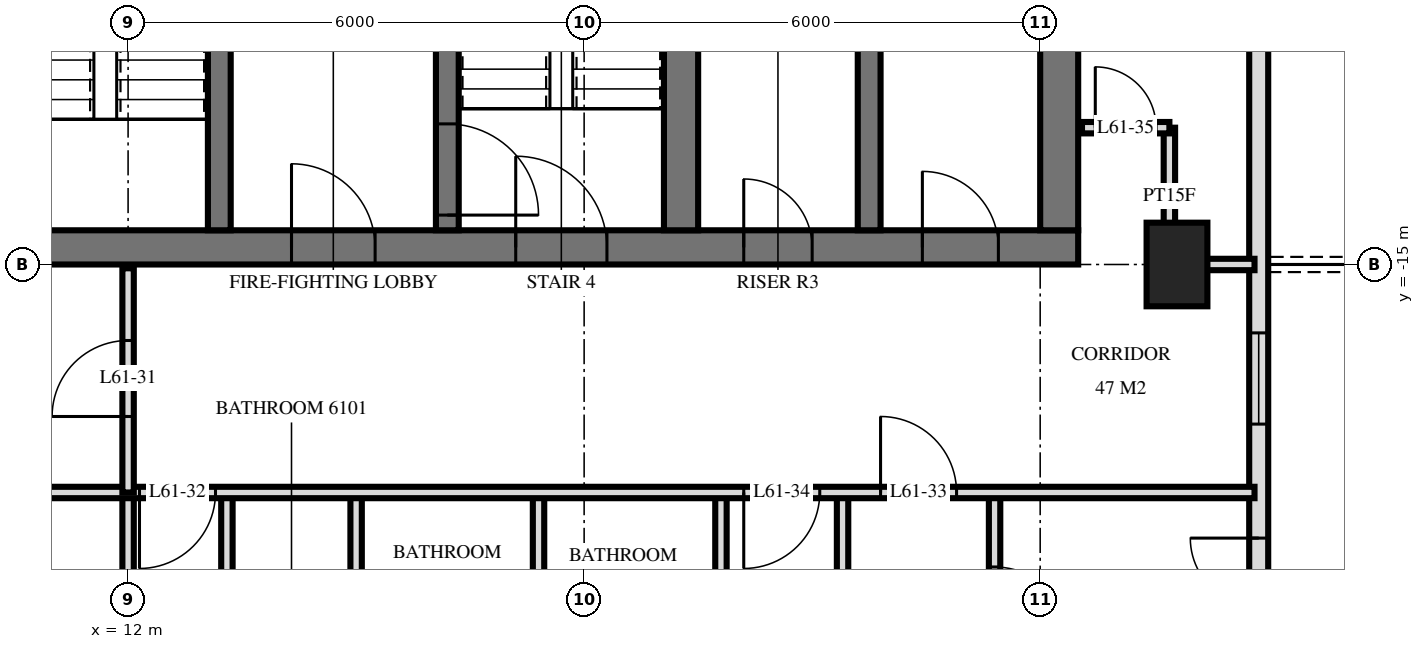
"""IFC4 building model, lengths in metres.
Left out: names, types, materials, properties, quantities, classifications, styles, units other than length and angle.
Written with IfcOpenShell. Run it as: python <this file> out.ifc"""

import sys

from ifc_helpers import new_model, si_unit, direction, frame, frame_2d, origin, origin_2d, place, context, subcontext, project, spatial, rectangle, extrude, element, fill, save


model = new_model("IFC4")
c1 = context("Model", 3, precision=1e-05, world=origin(), true_north=direction((0.0, 1.0)))
c2 = subcontext(c1, "Body", "Model", "MODEL_VIEW")
j1 = project(units=[si_unit("LENGTHUNIT", "METRE"), si_unit("PLANEANGLEUNIT", "RADIAN")], contexts=[c1])
p1 = place(None, origin())
s1 = spatial("IfcSite", under=j1, at=p1, CompositionType="ELEMENT")
p2 = place(p1, origin())
s2 = spatial("IfcBuilding", under=s1, at=p2, CompositionType="ELEMENT")
p3 = place(p2, frame((0.0, 0.0, 232.6)))
s3 = spatial("IfcBuildingStorey", under=s2, at=p3, CompositionType="ELEMENT", Elevation=232.6)
p4 = place(p3, frame((25.8, -15.0, 0.0), z_axis=(0.0, 0.0, 1.0), x_axis=(0.0, 1.0, 0.0)))
e1 = element("IfcColumn", 1, at=p4, inside=s3, PredefinedType="COLUMN", context=c2, shape_type="SweptSolid", body=[
    extrude(rectangle(XDim=1.1, YDim=0.8, at=origin_2d()), origin(), (0.0, 0.0, 1.0), 3.5),
])
p5 = place(p3, frame((10.0, -14.775, 0.0), z_axis=(0.0, 0.0, 1.0), x_axis=(1.0, 0.0, 0.0)))
e2 = element("IfcWall", 2, at=p5, inside=s3, PredefinedType="SHEAR", context=c2, shape_type="SweptSolid", body=[
    extrude(rectangle(XDim=14.5, YDim=0.45, at=frame_2d((7.25, 0.0))), origin(), (0.0, 0.0, 1.0), 3.5),
])
p6 = place(p5, frame((7.1, 0.0, 0.0)))
e3 = element("IfcOpeningElement", 3, at=p6, cuts=e2, PredefinedType="OPENING", context=c2, shape_type="SweptSolid", body=[
    extrude(rectangle(XDim=1.2, YDim=2.1, at=frame_2d((0.6, 1.05))), frame((0.0, 0.235, 0.0), z_axis=(0.0, -1.0, 0.0), x_axis=(1.0, 0.0, 0.0)), (0.0, 0.0, 1.0), 0.47),
])
p7 = place(p5, frame((4.15, 0.0, 0.0)))
e4 = element("IfcOpeningElement", 4, at=p7, cuts=e2, PredefinedType="OPENING", context=c2, shape_type="SweptSolid", body=[
    extrude(rectangle(XDim=1.1, YDim=2.1, at=frame_2d((0.55, 1.05))), frame((0.0, 0.235, 0.0), z_axis=(0.0, -1.0, 0.0), x_axis=(1.0, 0.0, 0.0)), (0.0, 0.0, 1.0), 0.47),
])
p8 = place(p5, frame((10.1, 0.0, 0.0)))
e5 = element("IfcOpeningElement", 5, at=p8, cuts=e2, PredefinedType="OPENING", context=c2, shape_type="SweptSolid", body=[
    extrude(rectangle(XDim=0.9, YDim=2.1, at=frame_2d((0.45, 1.05))), frame((0.0, 0.235, 0.0), z_axis=(0.0, -1.0, 0.0), x_axis=(1.0, 0.0, 0.0)), (0.0, 0.0, 1.0), 0.47),
])
p9 = place(p5, frame((12.45, 0.0, 0.0)))
e6 = element("IfcOpeningElement", 6, at=p9, cuts=e2, PredefinedType="OPENING", context=c2, shape_type="SweptSolid", body=[
    extrude(rectangle(XDim=1.0, YDim=2.1, at=frame_2d((0.5, 1.05))), frame((0.0, 0.235, 0.0), z_axis=(0.0, -1.0, 0.0), x_axis=(1.0, 0.0, 0.0)), (0.0, 0.0, 1.0), 0.47),
])
p10 = place(p3, frame((24.25, -14.55, 0.0), z_axis=(0.0, 0.0, 1.0), x_axis=(0.0, 1.0, 0.0)))
e7 = element("IfcWall", 7, at=p10, inside=s3, PredefinedType="SHEAR", context=c2, shape_type="SweptSolid", body=[
    extrude(rectangle(XDim=14.1, YDim=0.5, at=frame_2d((7.05, 0.0))), origin(), (0.0, 0.0, 1.0), 3.5),
])
p11 = place(p3, frame((13.2, -14.55, 0.0), z_axis=(0.0, 0.0, 1.0), x_axis=(0.0, 1.0, 0.0)))
e8 = element("IfcWall", 8, at=p11, inside=s3, PredefinedType="SHEAR", context=c2, shape_type="SweptSolid", body=[
    extrude(rectangle(XDim=5.4, YDim=0.3, at=frame_2d((2.7, 0.0))), origin(), (0.0, 0.0, 1.0), 3.5),
])
p12 = place(p11, frame((4.0, 0.0, 0.0)))
e9 = element("IfcOpeningElement", 9, at=p12, cuts=e8, PredefinedType="OPENING", context=c2, shape_type="SweptSolid", body=[
    extrude(rectangle(XDim=1.2, YDim=2.1, at=frame_2d((0.6, 1.05))), frame((0.0, 0.16, 0.0), z_axis=(0.0, -1.0, 0.0), x_axis=(1.0, 0.0, 0.0)), (0.0, 0.0, 1.0), 0.32),
])
p13 = place(p3, frame((16.2, -14.55, 0.0), z_axis=(0.0, 0.0, 1.0), x_axis=(0.0, 1.0, 0.0)))
e10 = element("IfcWall", 10, at=p13, inside=s3, PredefinedType="SHEAR", context=c2, shape_type="SweptSolid", body=[
    extrude(rectangle(XDim=5.4, YDim=0.3, at=frame_2d((2.7, 0.0))), origin(), (0.0, 0.0, 1.0), 3.5),
])
p14 = place(p13, frame((0.2, 0.0, 0.0)))
e11 = element("IfcOpeningElement", 11, at=p14, cuts=e10, PredefinedType="OPENING", context=c2, shape_type="SweptSolid", body=[
    extrude(rectangle(XDim=1.2, YDim=2.1, at=frame_2d((0.6, 1.05))), frame((0.0, 0.16, 0.0), z_axis=(0.0, -1.0, 0.0), x_axis=(1.0, 0.0, 0.0)), (0.0, 0.0, 1.0), 0.32),
])
p15 = place(p3, frame((19.275, -14.55, 0.0), z_axis=(0.0, 0.0, 1.0), x_axis=(0.0, 1.0, 0.0)))
e12 = element("IfcWall", 12, at=p15, inside=s3, PredefinedType="SHEAR", context=c2, shape_type="SweptSolid", body=[
    extrude(rectangle(XDim=5.4, YDim=0.45, at=frame_2d((2.7, 0.0))), origin(), (0.0, 0.0, 1.0), 3.5),
])
p16 = place(p3, frame((21.75, -14.55, 0.0), z_axis=(0.0, 0.0, 1.0), x_axis=(0.0, 1.0, 0.0)))
e13 = element("IfcWall", 13, at=p16, inside=s3, PredefinedType="SHEAR", context=c2, shape_type="SweptSolid", body=[
    extrude(rectangle(XDim=5.4, YDim=0.3, at=frame_2d((2.7, 0.0))), origin(), (0.0, 0.0, 1.0), 3.5),
])
p17 = place(p3, frame((26.875, -24.875, 0.0), z_axis=(0.0, 0.0, 1.0), x_axis=(0.0, 1.0, 0.0)))
e14 = element("IfcWall", 14, at=p17, inside=s3, PredefinedType="SOLIDWALL", context=c2, shape_type="SweptSolid", body=[
    extrude(rectangle(XDim=21.551, YDim=0.25, at=frame_2d((10.775, 0.0))), origin(), (0.0, 0.0, 1.0), 3.22),
])
p18 = place(p17, frame((0.575, 0.0, 0.0)))
e15 = element("IfcOpeningElement", 15, at=p18, cuts=e14, PredefinedType="OPENING", context=c2, shape_type="SweptSolid", body=[
    extrude(rectangle(XDim=1.8, YDim=2.4, at=frame_2d((0.9, 1.2))), frame((0.0, 0.135, 0.0), z_axis=(0.0, -1.0, 0.0), x_axis=(1.0, 0.0, 0.0)), (0.0, 0.0, 1.0), 0.27),
])
p19 = place(p17, frame((4.475, 0.0, 0.0)))
e16 = element("IfcOpeningElement", 16, at=p19, cuts=e14, PredefinedType="OPENING", context=c2, shape_type="SweptSolid", body=[
    extrude(rectangle(XDim=1.8, YDim=2.4, at=frame_2d((0.9, 1.2))), frame((0.0, 0.135, 0.0), z_axis=(0.0, -1.0, 0.0), x_axis=(1.0, 0.0, 0.0)), (0.0, 0.0, 1.0), 0.27),
])
p20 = place(p17, frame((7.775, 0.0, 0.9)))
e17 = element("IfcOpeningElement", 17, at=p20, cuts=e14, PredefinedType="OPENING", context=c2, shape_type="SweptSolid", body=[
    extrude(rectangle(XDim=1.2, YDim=1.5, at=frame_2d((0.6, 0.75))), frame((0.0, 0.135, 0.0), z_axis=(0.0, -1.0, 0.0), x_axis=(1.0, 0.0, 0.0)), (0.0, 0.0, 1.0), 0.27),
])
p21 = place(p17, frame((13.1, 0.0, 0.0)))
e18 = element("IfcOpeningElement", 18, at=p21, cuts=e14, PredefinedType="OPENING", context=c2, shape_type="SweptSolid", body=[
    extrude(rectangle(XDim=1.8, YDim=2.4, at=frame_2d((0.9, 1.2))), frame((0.0, 0.135, 0.0), z_axis=(0.0, -1.0, 0.0), x_axis=(1.0, 0.0, 0.0)), (0.0, 0.0, 1.0), 0.27),
])
p22 = place(p3, frame((25.7, -15.0, 0.0), z_axis=(0.0, 0.0, 1.0), x_axis=(0.0, 1.0, 0.0)))
e19 = element("IfcWall", 19, at=p22, inside=s3, PredefinedType="PARTITIONING", context=c2, shape_type="SweptSolid", body=[
    extrude(rectangle(XDim=1.8, YDim=0.15, at=frame_2d((0.9, 0.0))), origin(), (0.0, 0.0, 1.0), 3.22),
])
p23 = place(p3, frame((23.4, -21.0, 0.0), z_axis=(0.0, 0.0, 1.0), x_axis=(0.0, 1.0, 0.0)))
e20 = element("IfcWall", 20, at=p23, inside=s3, PredefinedType="PARTITIONING", context=c2, shape_type="SweptSolid", body=[
    extrude(rectangle(XDim=3.0, YDim=0.15, at=frame_2d((1.5, 0.0))), origin(), (0.0, 0.0, 1.0), 3.22),
])
p24 = place(p23, frame((1.02, 0.0, 0.0)))
e21 = element("IfcOpeningElement", 21, at=p24, cuts=e20, PredefinedType="OPENING", context=c2, shape_type="SweptSolid", body=[
    extrude(rectangle(XDim=1.0, YDim=2.1, at=frame_2d((0.5, 1.05))), frame((0.0, 0.085, 0.0), z_axis=(0.0, -1.0, 0.0), x_axis=(1.0, 0.0, 0.0)), (0.0, 0.0, 1.0), 0.17),
])
for number, where, z_axis, x_axis in (
    (22, (21.4, -21.0, 0.0), (0.0, 0.0, 1.0), (0.0, 1.0, 0.0)),
    (23, (19.8, -21.0, 0.0), (0.0, 0.0, 1.0), (0.0, 1.0, 0.0)),
    (24, (17.4, -21.0, 0.0), (0.0, 0.0, 1.0), (0.0, 1.0, 0.0)),
):
    element("IfcWall", number, at=place(p3, frame(where, z_axis=z_axis, x_axis=x_axis)), inside=s3, PredefinedType="PARTITIONING", context=c2, shape_type="SweptSolid", body=[
        extrude(rectangle(XDim=3.0, YDim=0.15, at=frame_2d((1.5, 0.0))), origin(), (0.0, 0.0, 1.0), 3.22),
    ])
p25 = place(p3, frame((15.0, -29.22, 0.0), z_axis=(0.0, 0.0, 1.0), x_axis=(0.0, 1.0, 0.0)))
e25 = element("IfcWall", 25, at=p25, inside=s3, PredefinedType="PARTITIONING", context=c2, shape_type="SweptSolid", body=[
    extrude(rectangle(XDim=11.22, YDim=0.15, at=frame_2d((5.61, 0.0))), origin(), (0.0, 0.0, 1.0), 3.22),
])
p26 = place(p3, frame((13.3, -21.0, 0.0), z_axis=(0.0, 0.0, 1.0), x_axis=(0.0, 1.0, 0.0)))
e26 = element("IfcWall", 26, at=p26, inside=s3, PredefinedType="PARTITIONING", context=c2, shape_type="SweptSolid", body=[
    extrude(rectangle(XDim=3.0, YDim=0.15, at=frame_2d((1.5, 0.0))), origin(), (0.0, 0.0, 1.0), 3.22),
])
p27 = place(p26, frame((1.12, 0.0, 0.0)))
e27 = element("IfcOpeningElement", 27, at=p27, cuts=e26, PredefinedType="OPENING", context=c2, shape_type="SweptSolid", body=[
    extrude(rectangle(XDim=0.8, YDim=2.1, at=frame_2d((0.4, 1.05))), frame((0.0, 0.085, 0.0), z_axis=(0.0, -1.0, 0.0), x_axis=(1.0, 0.0, 0.0)), (0.0, 0.0, 1.0), 0.17),
])
p28 = place(p3, frame((12.0, -18.0, 0.0), z_axis=(0.0, 0.0, 1.0), x_axis=(0.0, 1.0, 0.0)))
e28 = element("IfcWall", 28, at=p28, inside=s3, PredefinedType="PARTITIONING", context=c2, shape_type="SweptSolid", body=[
    extrude(rectangle(XDim=2.95, YDim=0.15, at=frame_2d((1.475, 0.0))), origin(), (0.0, 0.0, 1.0), 3.22),
])
p29 = place(p28, frame((1.0, 0.0, 0.0)))
e29 = element("IfcOpeningElement", 29, at=p29, cuts=e28, PredefinedType="OPENING", context=c2, shape_type="SweptSolid", body=[
    extrude(rectangle(XDim=1.0, YDim=2.1, at=frame_2d((0.5, 1.05))), frame((0.0, 0.085, 0.0), z_axis=(0.0, -1.0, 0.0), x_axis=(1.0, 0.0, 0.0)), (0.0, 0.0, 1.0), 0.17),
])
p30 = place(p3, frame((12.0, -29.22, 0.0), z_axis=(0.0, 0.0, 1.0), x_axis=(0.0, 1.0, 0.0)))
e30 = element("IfcWall", 30, at=p30, inside=s3, PredefinedType="PARTITIONING", context=c2, shape_type="SweptSolid", body=[
    extrude(rectangle(XDim=11.22, YDim=0.15, at=frame_2d((5.61, 0.0))), origin(), (0.0, 0.0, 1.0), 3.22),
])
p31 = place(p3, frame((-26.82, -18.0, 0.0), z_axis=(0.0, 0.0, 1.0), x_axis=(1.0, 0.0, 0.0)))
e31 = element("IfcWall", 31, at=p31, inside=s3, PredefinedType="PARTITIONING", context=c2, shape_type="SweptSolid", body=[
    extrude(rectangle(XDim=53.64, YDim=0.15, at=frame_2d((26.82, 0.0))), origin(), (0.0, 0.0, 1.0), 3.22),
])
p32 = place(p31, frame((4.92, 0.0, 0.0)))
e32 = element("IfcOpeningElement", 32, at=p32, cuts=e31, PredefinedType="OPENING", context=c2, shape_type="SweptSolid", body=[
    extrude(rectangle(XDim=1.0, YDim=2.1, at=frame_2d((0.5, 1.05))), frame((0.0, 0.085, 0.0), z_axis=(0.0, -1.0, 0.0), x_axis=(1.0, 0.0, 0.0)), (0.0, 0.0, 1.0), 0.17),
])
p33 = place(p31, frame((1.62, 0.0, 0.0)))
e33 = element("IfcOpeningElement", 33, at=p33, cuts=e31, PredefinedType="OPENING", context=c2, shape_type="SweptSolid", body=[
    extrude(rectangle(XDim=1.0, YDim=2.1, at=frame_2d((0.5, 1.05))), frame((0.0, 0.085, 0.0), z_axis=(0.0, -1.0, 0.0), x_axis=(1.0, 0.0, 0.0)), (0.0, 0.0, 1.0), 0.17),
])
p34 = place(p31, frame((38.97, 0.0, 0.0)))
e34 = element("IfcOpeningElement", 34, at=p34, cuts=e31, PredefinedType="OPENING", context=c2, shape_type="SweptSolid", body=[
    extrude(rectangle(XDim=1.0, YDim=2.1, at=frame_2d((0.5, 1.05))), frame((0.0, 0.085, 0.0), z_axis=(0.0, -1.0, 0.0), x_axis=(1.0, 0.0, 0.0)), (0.0, 0.0, 1.0), 0.17),
])
p35 = place(p31, frame((48.72, 0.0, 0.0)))
e35 = element("IfcOpeningElement", 35, at=p35, cuts=e31, PredefinedType="OPENING", context=c2, shape_type="SweptSolid", body=[
    extrude(rectangle(XDim=1.0, YDim=2.1, at=frame_2d((0.5, 1.05))), frame((0.0, 0.085, 0.0), z_axis=(0.0, -1.0, 0.0), x_axis=(1.0, 0.0, 0.0)), (0.0, 0.0, 1.0), 0.17),
])
p36 = place(p31, frame((46.92, 0.0, 0.0)))
e36 = element("IfcOpeningElement", 36, at=p36, cuts=e31, PredefinedType="OPENING", context=c2, shape_type="SweptSolid", body=[
    extrude(rectangle(XDim=1.0, YDim=2.1, at=frame_2d((0.5, 1.05))), frame((0.0, 0.085, 0.0), z_axis=(0.0, -1.0, 0.0), x_axis=(1.0, 0.0, 0.0)), (0.0, 0.0, 1.0), 0.17),
])
p37 = place(p31, frame((18.82, 0.0, 0.0)))
e37 = element("IfcOpeningElement", 37, at=p37, cuts=e31, PredefinedType="OPENING", context=c2, shape_type="SweptSolid", body=[
    extrude(rectangle(XDim=1.0, YDim=2.1, at=frame_2d((0.5, 1.05))), frame((0.0, 0.085, 0.0), z_axis=(0.0, -1.0, 0.0), x_axis=(1.0, 0.0, 0.0)), (0.0, 0.0, 1.0), 0.17),
])
p38 = place(p31, frame((27.82, 0.0, 0.0)))
e38 = element("IfcOpeningElement", 38, at=p38, cuts=e31, PredefinedType="OPENING", context=c2, shape_type="SweptSolid", body=[
    extrude(rectangle(XDim=1.0, YDim=2.1, at=frame_2d((0.5, 1.05))), frame((0.0, 0.085, 0.0), z_axis=(0.0, -1.0, 0.0), x_axis=(1.0, 0.0, 0.0)), (0.0, 0.0, 1.0), 0.17),
])
p39 = place(p31, frame((35.32, 0.0, 0.0)))
e39 = element("IfcOpeningElement", 39, at=p39, cuts=e31, PredefinedType="OPENING", context=c2, shape_type="SweptSolid", body=[
    extrude(rectangle(XDim=1.0, YDim=2.1, at=frame_2d((0.5, 1.05))), frame((0.0, 0.085, 0.0), z_axis=(0.0, -1.0, 0.0), x_axis=(1.0, 0.0, 0.0)), (0.0, 0.0, 1.0), 0.17),
])
p40 = place(p3, frame((25.7, -15.0, 0.0), z_axis=(0.0, 0.0, 1.0), x_axis=(1.0, 0.0, 0.0)))
e40 = element("IfcWall", 40, at=p40, inside=s3, PredefinedType="PARTITIONING", context=c2, shape_type="SweptSolid", body=[
    extrude(rectangle(XDim=1.12, YDim=0.15, at=frame_2d((0.56, 0.0))), origin(), (0.0, 0.0, 1.0), 3.22),
])
p41 = place(p3, frame((24.55, -13.2, 0.0), z_axis=(0.0, 0.0, 1.0), x_axis=(1.0, 0.0, 0.0)))
e41 = element("IfcWall", 41, at=p41, inside=s3, PredefinedType="PARTITIONING", context=c2, shape_type="SweptSolid", body=[
    extrude(rectangle(XDim=1.15, YDim=0.15, at=frame_2d((0.575, 0.0))), origin(), (0.0, 0.0, 1.0), 3.22),
])
p42 = place(p41, frame((0.175, 0.0, 0.0)))
e42 = element("IfcOpeningElement", 42, at=p42, cuts=e41, PredefinedType="OPENING", context=c2, shape_type="SweptSolid", body=[
    extrude(rectangle(XDim=0.8, YDim=2.1, at=frame_2d((0.4, 1.05))), frame((0.0, 0.085, 0.0), z_axis=(0.0, -1.0, 0.0), x_axis=(1.0, 0.0, 0.0)), (0.0, 0.0, 1.0), 0.17),
])
p43 = place(p19, origin())
e43 = element("IfcDoor", 43, at=p43, inside=s3, OperationType="DOUBLE_DOOR_SINGLE_SWING", PredefinedType="DOOR", context=c2, shape_type="SweptSolid", body=[
    extrude(rectangle(XDim=1.8, YDim=2.4, at=frame_2d((0.9, 1.2))), frame((0.0, 0.025, 0.0), z_axis=(0.0, -1.0, 0.0), x_axis=(1.0, 0.0, 0.0)), (0.0, 0.0, 1.0), 0.05),
])
fill(e16, e43)
p44 = place(p20, origin())
e44 = element("IfcWindow", 44, at=p44, inside=s3, PartitioningType="SINGLE_PANEL", PredefinedType="WINDOW", context=c2, shape_type="SweptSolid", body=[
    extrude(rectangle(XDim=1.2, YDim=1.5, at=frame_2d((0.6, 0.75))), frame((0.0, 0.03, 0.0), z_axis=(0.0, -1.0, 0.0), x_axis=(1.0, 0.0, 0.0)), (0.0, 0.0, 1.0), 0.06),
])
fill(e17, e44)
p45 = place(p6, origin())
e45 = element("IfcDoor", 45, at=p45, inside=s3, OperationType="SINGLE_SWING_RIGHT", PredefinedType="DOOR", context=c2, shape_type="SweptSolid", body=[
    extrude(rectangle(XDim=1.2, YDim=2.1, at=frame_2d((0.6, 1.05))), frame((0.0, 0.025, 0.0), z_axis=(0.0, -1.0, 0.0), x_axis=(1.0, 0.0, 0.0)), (0.0, 0.0, 1.0), 0.05),
])
fill(e3, e45)
p46 = place(p7, origin())
e46 = element("IfcDoor", 46, at=p46, inside=s3, OperationType="SINGLE_SWING_RIGHT", PredefinedType="DOOR", context=c2, shape_type="SweptSolid", body=[
    extrude(rectangle(XDim=1.1, YDim=2.1, at=frame_2d((0.55, 1.05))), frame((0.0, 0.025, 0.0), z_axis=(0.0, -1.0, 0.0), x_axis=(1.0, 0.0, 0.0)), (0.0, 0.0, 1.0), 0.05),
])
fill(e4, e46)
p47 = place(p8, origin())
e47 = element("IfcDoor", 47, at=p47, inside=s3, OperationType="SINGLE_SWING_RIGHT", PredefinedType="DOOR", context=c2, shape_type="SweptSolid", body=[
    extrude(rectangle(XDim=0.9, YDim=2.1, at=frame_2d((0.45, 1.05))), frame((0.0, 0.025, 0.0), z_axis=(0.0, -1.0, 0.0), x_axis=(1.0, 0.0, 0.0)), (0.0, 0.0, 1.0), 0.05),
])
fill(e5, e47)
p48 = place(p9, origin())
e48 = element("IfcDoor", 48, at=p48, inside=s3, OperationType="SINGLE_SWING_RIGHT", PredefinedType="DOOR", context=c2, shape_type="SweptSolid", body=[
    extrude(rectangle(XDim=1.0, YDim=2.1, at=frame_2d((0.5, 1.05))), frame((0.0, 0.025, 0.0), z_axis=(0.0, -1.0, 0.0), x_axis=(1.0, 0.0, 0.0)), (0.0, 0.0, 1.0), 0.05),
])
fill(e6, e48)
p49 = place(p14, frame((0.6, 0.0, 0.0), z_axis=(0.0, 0.0, 1.0), x_axis=(-1.0, 0.0, 0.0)))
e49 = element("IfcDoor", 49, at=p49, inside=s3, OperationType="SINGLE_SWING_LEFT", PredefinedType="DOOR", context=c2, shape_type="SweptSolid", body=[
    extrude(rectangle(XDim=1.2, YDim=2.1, at=frame_2d((0.0, 1.05))), frame((0.0, -0.025, 0.0), z_axis=(0.0, 1.0, 0.0), x_axis=(-1.0, 0.0, 0.0)), (0.0, 0.0, 1.0), 0.05),
])
fill(e11, e49)
p50 = place(p29, origin())
e50 = element("IfcDoor", 50, at=p50, inside=s3, OperationType="SINGLE_SWING_RIGHT", PredefinedType="DOOR", context=c2, shape_type="SweptSolid", body=[
    extrude(rectangle(XDim=1.0, YDim=2.1, at=frame_2d((0.5, 1.05))), frame((0.0, 0.025, 0.0), z_axis=(0.0, -1.0, 0.0), x_axis=(1.0, 0.0, 0.0)), (0.0, 0.0, 1.0), 0.05),
])
fill(e29, e50)
p51 = place(p34, frame((0.5, 0.0, 0.0), z_axis=(0.0, 0.0, 1.0), x_axis=(-1.0, 0.0, 0.0)))
e51 = element("IfcDoor", 51, at=p51, inside=s3, OperationType="SINGLE_SWING_LEFT", PredefinedType="DOOR", context=c2, shape_type="SweptSolid", body=[
    extrude(rectangle(XDim=1.0, YDim=2.1, at=frame_2d((0.0, 1.05))), frame((0.0, -0.025, 0.0), z_axis=(0.0, 1.0, 0.0), x_axis=(-1.0, 0.0, 0.0)), (0.0, 0.0, 1.0), 0.05),
])
fill(e34, e51)
p52 = place(p35, origin())
e52 = element("IfcDoor", 52, at=p52, inside=s3, OperationType="SINGLE_SWING_RIGHT", PredefinedType="DOOR", context=c2, shape_type="SweptSolid", body=[
    extrude(rectangle(XDim=1.0, YDim=2.1, at=frame_2d((0.5, 1.05))), frame((0.0, 0.025, 0.0), z_axis=(0.0, -1.0, 0.0), x_axis=(1.0, 0.0, 0.0)), (0.0, 0.0, 1.0), 0.05),
])
fill(e35, e52)
p53 = place(p36, frame((0.5, 0.0, 0.0), z_axis=(0.0, 0.0, 1.0), x_axis=(-1.0, 0.0, 0.0)))
e53 = element("IfcDoor", 53, at=p53, inside=s3, OperationType="SINGLE_SWING_LEFT", PredefinedType="DOOR", context=c2, shape_type="SweptSolid", body=[
    extrude(rectangle(XDim=1.0, YDim=2.1, at=frame_2d((0.0, 1.05))), frame((0.0, -0.025, 0.0), z_axis=(0.0, 1.0, 0.0), x_axis=(-1.0, 0.0, 0.0)), (0.0, 0.0, 1.0), 0.05),
])
fill(e36, e53)
p54 = place(p42, origin())
e54 = element("IfcDoor", 54, at=p54, inside=s3, OperationType="SINGLE_SWING_RIGHT", PredefinedType="DOOR", context=c2, shape_type="SweptSolid", body=[
    extrude(rectangle(XDim=0.8, YDim=2.1, at=frame_2d((0.4, 1.05))), frame((0.0, 0.025, 0.0), z_axis=(0.0, -1.0, 0.0), x_axis=(1.0, 0.0, 0.0)), (0.0, 0.0, 1.0), 0.05),
])
fill(e42, e54)
p55 = place(p24, frame((0.5, 0.0, 0.0), z_axis=(0.0, 0.0, 1.0), x_axis=(-1.0, 0.0, 0.0)))
e55 = element("IfcDoor", 55, at=p55, inside=s3, OperationType="SINGLE_SWING_LEFT", PredefinedType="DOOR", context=c2, shape_type="SweptSolid", body=[
    extrude(rectangle(XDim=1.0, YDim=2.1, at=frame_2d((0.0, 1.05))), frame((0.0, -0.025, 0.0), z_axis=(0.0, 1.0, 0.0), x_axis=(-1.0, 0.0, 0.0)), (0.0, 0.0, 1.0), 0.05),
])
fill(e21, e55)
save(model, sys.argv[1])
